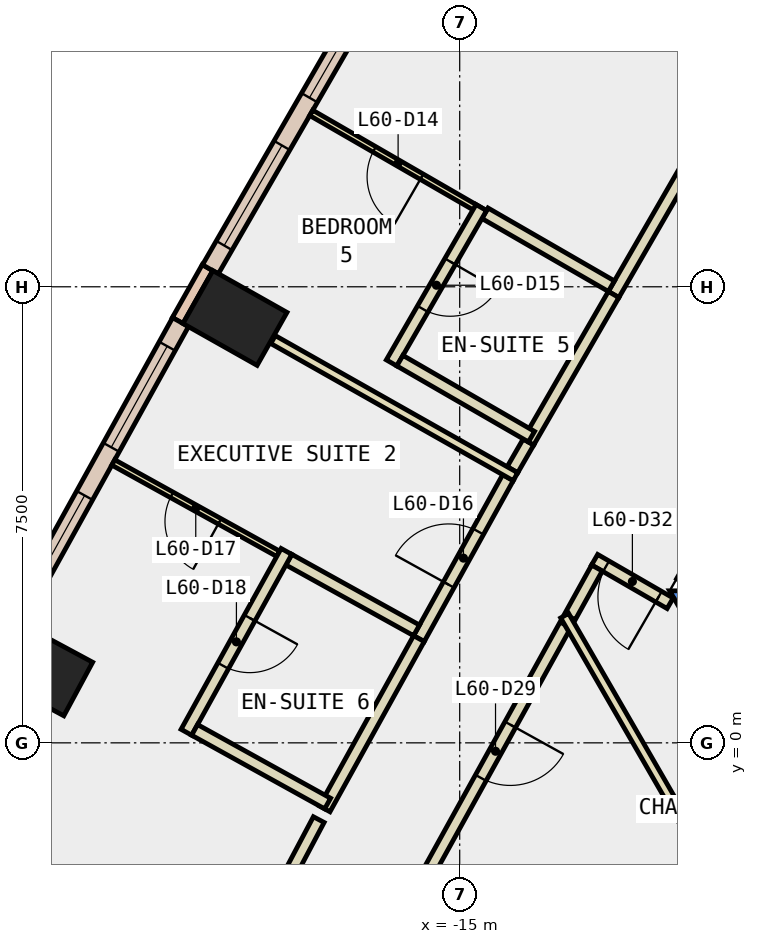
"""IFC4 building model, lengths in metres.
Left out: names, types, materials, properties, quantities, classifications, styles, units other than length and angle.
Written with IfcOpenShell. Run it as: python <this file> out.ifc"""

import sys

from ifc_helpers import new_model, si_unit, direction, frame, frame_2d, origin, origin_2d, place, context, subcontext, project, spatial, polyline, rectangle, outline, extrude, element, fill, save


model = new_model("IFC4")
c1 = context("Model", 3, precision=1e-05, world=origin(), true_north=direction((0.0, 1.0)))
c2 = subcontext(c1, "Body", "Model", "MODEL_VIEW")
j1 = project(units=[si_unit("LENGTHUNIT", "METRE"), si_unit("PLANEANGLEUNIT", "RADIAN")], contexts=[c1])
p1 = place(None, origin())
s1 = spatial("IfcSite", under=j1, at=p1, CompositionType="ELEMENT")
p2 = place(p1, origin())
s2 = spatial("IfcBuilding", under=s1, at=p2, CompositionType="ELEMENT")
p3 = place(p2, frame((0.0, 0.0, 263.0)))
s3 = spatial("IfcBuildingStorey", under=s2, at=p3, CompositionType="ELEMENT", Elevation=263.0)
for number, where, z_axis, x_axis in (
    (1, (-18.696, 6.987, -0.34), (0.0, 0.0, 1.0), (0.491, 0.871, 0.0)),
    (2, (-21.89, 1.217, -0.34), (0.0, 0.0, 1.0), (0.474, 0.881, 0.0)),
):
    element("IfcColumn", number, at=place(p3, frame(where, z_axis=z_axis, x_axis=x_axis)), inside=s3, PredefinedType="COLUMN", context=c2, shape_type="SweptSolid", body=[
        extrude(rectangle(XDim=1.0, YDim=1.4, at=origin_2d()), origin(), (0.0, 0.0, 1.0), 3.6),
    ])
p4 = place(p3, frame((0.0, 0.0, -0.34)))
e3 = element("IfcWall", 3, at=p4, inside=s3, PredefinedType="SHEAR", context=c2, shape_type="SweptSolid", body=[
    extrude(outline(polyline([(-11.547, 2.5), (-5.774, -7.5), (-5.427, -6.9), (-10.854, 2.5), (-11.547, 2.5)])), origin(), (0.0, 0.0, 1.0), 3.6),
])
p5 = place(p3, frame((-19.147, 7.815, 0.0), z_axis=(0.0, 0.0, 1.0), x_axis=(-0.491848119507, -0.870681013539, 0.0)))
e4 = element("IfcWall", 4, at=p5, inside=s3, PredefinedType="STANDARD", context=c2, shape_type="SweptSolid", body=[
    extrude(rectangle(XDim=1.0, YDim=0.2, at=frame_2d((0.5, 0.0))), origin(), (0.0, 0.0, 1.0), 3.26),
])
p6 = place(p3, frame((-16.294, 12.647, 0.0), z_axis=(0.0, 0.0, 1.0), x_axis=(-0.500041292042, -0.866001562501, 0.0)))
e5 = element("IfcWall", 5, at=p6, inside=s3, PredefinedType="STANDARD", context=c2, shape_type="SweptSolid", body=[
    extrude(rectangle(XDim=5.612, YDim=0.3, at=frame_2d((2.806, 0.0))), origin(), (0.0, 0.0, 1.0), 3.26),
])
p7 = place(p6, frame((0.453, 0.0, 0.9)))
e6 = element("IfcOpeningElement", 6, at=p7, cuts=e5, PredefinedType="OPENING", context=c2, shape_type="SweptSolid", body=[
    extrude(rectangle(XDim=1.9, YDim=2.0, at=frame_2d((0.95, 1.0))), frame((0.0, 0.16, 0.0), z_axis=(0.0, -1.0, 0.0), x_axis=(1.0, 0.0, 0.0)), (0.0, 0.0, 1.0), 0.32),
])
p8 = place(p6, frame((3.259, 0.0, 0.9)))
e7 = element("IfcOpeningElement", 7, at=p8, cuts=e5, PredefinedType="OPENING", context=c2, shape_type="SweptSolid", body=[
    extrude(rectangle(XDim=1.9, YDim=2.0, at=frame_2d((0.95, 1.0))), frame((0.0, 0.16, 0.0), z_axis=(0.0, -1.0, 0.0), x_axis=(1.0, 0.0, 0.0)), (0.0, 0.0, 1.0), 0.32),
])
p9 = place(p3, frame((-19.591, 6.919, 0.0), z_axis=(0.0, 0.0, 1.0), x_axis=(-0.484260568952, -0.874923826032, 0.0)))
e8 = element("IfcWall", 8, at=p9, inside=s3, PredefinedType="STANDARD", context=c2, shape_type="SweptSolid", body=[
    extrude(rectangle(XDim=5.611, YDim=0.3, at=frame_2d((2.805, 0.0))), origin(), (0.0, 0.0, 1.0), 3.26),
])
p10 = place(p9, frame((0.453, 0.0, 0.9)))
e9 = element("IfcOpeningElement", 9, at=p10, cuts=e8, PredefinedType="OPENING", context=c2, shape_type="SweptSolid", body=[
    extrude(rectangle(XDim=1.9, YDim=2.0, at=frame_2d((0.95, 1.0))), frame((0.0, 0.16, 0.0), z_axis=(0.0, -1.0, 0.0), x_axis=(1.0, 0.0, 0.0)), (0.0, 0.0, 1.0), 0.32),
])
p11 = place(p9, frame((3.258, 0.0, 0.9)))
e10 = element("IfcOpeningElement", 10, at=p11, cuts=e8, PredefinedType="OPENING", context=c2, shape_type="SweptSolid", body=[
    extrude(rectangle(XDim=1.9, YDim=2.0, at=frame_2d((0.95, 1.0))), frame((0.0, 0.16, 0.0), z_axis=(0.0, -1.0, 0.0), x_axis=(1.0, 0.0, 0.0)), (0.0, 0.0, 1.0), 0.32),
])
p12 = place(p3, frame((-11.539, 2.295, 0.0), z_axis=(0.0, 0.0, 1.0), x_axis=(-0.866023989838, 0.500002449018, 0.0)))
e11 = element("IfcWall", 11, at=p12, inside=s3, PredefinedType="PARTITIONING", context=c2, shape_type="SweptSolid", body=[
    extrude(rectangle(XDim=1.434, YDim=0.2, at=frame_2d((0.717, 0.0))), origin(), (0.0, 0.0, 1.0), 3.26),
])
p13 = place(p12, frame((0.217, 0.0, 0.0)))
e12 = element("IfcOpeningElement", 12, at=p13, cuts=e11, PredefinedType="OPENING", context=c2, shape_type="SweptSolid", body=[
    extrude(rectangle(XDim=1.0, YDim=2.1, at=frame_2d((0.5, 1.05))), frame((0.0, 0.11, 0.0), z_axis=(0.0, -1.0, 0.0), x_axis=(1.0, 0.0, 0.0)), (0.0, 0.0, 1.0), 0.22),
])
p14 = place(p3, frame((-12.743, 2.875, 0.0), z_axis=(0.0, 0.0, 1.0), x_axis=(-0.484334040176, -0.8748831565, 0.0)))
e13 = element("IfcWall", 13, at=p14, inside=s3, PredefinedType="PARTITIONING", context=c2, shape_type="SweptSolid", body=[
    extrude(rectangle(XDim=0.919, YDim=0.2, at=frame_2d((0.459, 0.0))), origin(), (0.0, 0.0, 1.0), 3.26),
])
p15 = place(p3, frame((-13.261, 1.939, 0.0), z_axis=(0.0, 0.0, 1.0), x_axis=(-0.484323615817, -0.874888927329, 0.0)))
e14 = element("IfcWall", 14, at=p15, inside=s3, PredefinedType="PARTITIONING", context=c2, shape_type="SweptSolid", body=[
    extrude(rectangle(XDim=4.747, YDim=0.2, at=frame_2d((2.374, 0.0))), origin(), (0.0, 0.0, 1.0), 3.26),
])
p16 = place(p15, frame((1.874, 0.0, 0.0)))
e15 = element("IfcOpeningElement", 15, at=p16, cuts=e14, PredefinedType="OPENING", context=c2, shape_type="SweptSolid", body=[
    extrude(rectangle(XDim=1.0, YDim=2.1, at=frame_2d((0.5, 1.05))), frame((0.0, 0.11, 0.0), z_axis=(0.0, -1.0, 0.0), x_axis=(1.0, 0.0, 0.0)), (0.0, 0.0, 1.0), 0.22),
])
p17 = place(p3, frame((-12.469, 7.373, 0.0), z_axis=(0.0, 0.0, 1.0), x_axis=(0.500129289791, 0.86595074542, 0.0)))
e16 = element("IfcWall", 16, at=p17, inside=s3, PredefinedType="PARTITIONING", context=c2, shape_type="SweptSolid", body=[
    extrude(rectangle(XDim=3.099, YDim=0.2, at=frame_2d((1.55, 0.0))), origin(), (0.0, 0.0, 1.0), 3.26),
])
p18 = place(p3, frame((-14.132, 4.492, 0.0), z_axis=(0.0, 0.0, 1.0), x_axis=(0.499829488579, 0.86612382622, 0.0)))
e17 = element("IfcWall", 17, at=p18, inside=s3, PredefinedType="PARTITIONING", context=c2, shape_type="SweptSolid", body=[
    extrude(rectangle(XDim=0.527, YDim=0.2, at=frame_2d((0.263, 0.0))), origin(), (0.0, 0.0, 1.0), 3.26),
])
p19 = place(p3, frame((-13.869, 4.948, 0.0), z_axis=(0.0, 0.0, 1.0), x_axis=(0.49994636267, 0.866056369097, 0.0)))
e18 = element("IfcWall", 18, at=p19, inside=s3, PredefinedType="PARTITIONING", context=c2, shape_type="SweptSolid", body=[
    extrude(rectangle(XDim=2.8, YDim=0.2, at=frame_2d((1.4, 0.0))), origin(), (0.0, 0.0, 1.0), 3.26),
])
p20 = place(p3, frame((-15.671, 1.714, 0.0), z_axis=(0.0, 0.0, 1.0), x_axis=(0.484203367026, 0.874955484216, 0.0)))
e19 = element("IfcWall", 19, at=p20, inside=s3, PredefinedType="PARTITIONING", context=c2, shape_type="SweptSolid", body=[
    extrude(rectangle(XDim=3.025, YDim=0.2, at=frame_2d((1.513, 0.0))), origin(), (0.0, 0.0, 1.0), 3.26),
])
p21 = place(p20, frame((1.013, 0.0, 0.0)))
e20 = element("IfcOpeningElement", 20, at=p21, cuts=e19, PredefinedType="OPENING", context=c2, shape_type="SweptSolid", body=[
    extrude(rectangle(XDim=1.0, YDim=2.1, at=frame_2d((0.5, 1.05))), frame((0.0, 0.11, 0.0), z_axis=(0.0, -1.0, 0.0), x_axis=(1.0, 0.0, 0.0)), (0.0, 0.0, 1.0), 0.22),
])
p22 = place(p3, frame((-20.229, -6.754, 0.0), z_axis=(0.0, 0.0, 1.0), x_axis=(0.468313568794, 0.883562335822, 0.0)))
e21 = element("IfcWall", 21, at=p22, inside=s3, PredefinedType="PARTITIONING", context=c2, shape_type="SweptSolid", body=[
    extrude(rectangle(XDim=6.216, YDim=0.2, at=frame_2d((3.108, 0.0))), origin(), (0.0, 0.0, 1.0), 3.26),
])
p23 = place(p3, frame((-17.221, -1.085, 0.0), z_axis=(0.0, 0.0, 1.0), x_axis=(0.48445041864, 0.874818719438, 0.0)))
e22 = element("IfcWall", 22, at=p23, inside=s3, PredefinedType="PARTITIONING", context=c2, shape_type="SweptSolid", body=[
    extrude(rectangle(XDim=3.2, YDim=0.2, at=frame_2d((1.6, 0.0))), origin(), (0.0, 0.0, 1.0), 3.26),
])
p24 = place(p3, frame((-13.274, 2.092, 0.0), z_axis=(0.0, 0.0, 1.0), x_axis=(0.500002592159, -0.866023907196, 0.0)))
e23 = element("IfcWall", 23, at=p24, inside=s3, PredefinedType="PARTITIONING", context=c2, shape_type="SweptSolid", body=[
    extrude(rectangle(XDim=6.538, YDim=0.15, at=frame_2d((3.269, 0.0))), origin(), (0.0, 0.0, 1.0), 3.26),
])
p25 = place(p3, frame((-14.584, 8.71, 0.0), z_axis=(0.0, 0.0, 1.0), x_axis=(-0.866008176907, 0.50002983664, 0.0)))
e24 = element("IfcWall", 24, at=p25, inside=s3, PredefinedType="PARTITIONING", context=c2, shape_type="SweptSolid", body=[
    extrude(rectangle(XDim=3.3, YDim=0.1, at=frame_2d((1.65, 0.0))), origin(), (0.0, 0.0, 1.0), 3.26),
])
p26 = place(p25, frame((1.2, 0.0, 0.0)))
e25 = element("IfcOpeningElement", 25, at=p26, cuts=e24, PredefinedType="OPENING", context=c2, shape_type="SweptSolid", body=[
    extrude(rectangle(XDim=0.9, YDim=2.1, at=frame_2d((0.45, 1.05))), frame((0.0, 0.06, 0.0), z_axis=(0.0, -1.0, 0.0), x_axis=(1.0, 0.0, 0.0)), (0.0, 0.0, 1.0), 0.12),
])
p27 = place(p3, frame((-12.505, 7.51, 0.0), z_axis=(0.0, 0.0, 1.0), x_axis=(-0.866277021052, 0.499563932643, 0.0)))
e26 = element("IfcWall", 26, at=p27, inside=s3, PredefinedType="PARTITIONING", context=c2, shape_type="SweptSolid", body=[
    extrude(rectangle(XDim=2.4, YDim=0.2, at=frame_2d((1.2, 0.0))), origin(), (0.0, 0.0, 1.0), 3.26),
])
p28 = place(p3, frame((-14.645, 8.803, 0.0), z_axis=(0.0, 0.0, 1.0), x_axis=(-0.500001826776, -0.866024349092, 0.0)))
e27 = element("IfcWall", 27, at=p28, inside=s3, PredefinedType="PARTITIONING", context=c2, shape_type="SweptSolid", body=[
    extrude(rectangle(XDim=2.95, YDim=0.2, at=frame_2d((1.475, 0.0))), origin(), (0.0, 0.0, 1.0), 3.26),
])
p29 = place(p28, frame((1.025, 0.0, 0.0)))
e28 = element("IfcOpeningElement", 28, at=p29, cuts=e27, PredefinedType="OPENING", context=c2, shape_type="SweptSolid", body=[
    extrude(rectangle(XDim=0.9, YDim=2.1, at=frame_2d((0.45, 1.05))), frame((0.0, 0.11, 0.0), z_axis=(0.0, -1.0, 0.0), x_axis=(1.0, 0.0, 0.0)), (0.0, 0.0, 1.0), 0.22),
])
p30 = place(p3, frame((-15.984, 6.285, 0.0), z_axis=(0.0, 0.0, 1.0), x_axis=(0.865998541277, -0.500046524342, 0.0)))
e29 = element("IfcWall", 29, at=p30, inside=s3, PredefinedType="PARTITIONING", context=c2, shape_type="SweptSolid", body=[
    extrude(rectangle(XDim=2.5, YDim=0.2, at=frame_2d((1.25, 0.0))), origin(), (0.0, 0.0, 1.0), 3.26),
])
p31 = place(p3, frame((-14.083, 4.377, 0.0), z_axis=(0.0, 0.0, 1.0), x_axis=(-0.870415885751, 0.492317159799, 0.0)))
e30 = element("IfcWall", 30, at=p31, inside=s3, PredefinedType="PARTITIONING", context=c2, shape_type="SweptSolid", body=[
    extrude(rectangle(XDim=4.581, YDim=0.15, at=frame_2d((2.29, 0.0))), origin(), (0.0, 0.0, 1.0), 3.26),
])
p32 = place(p3, frame((-17.985, 3.109, 0.0), z_axis=(0.0, 0.0, 1.0), x_axis=(-0.874762085098, 0.484552674614, 0.0)))
e31 = element("IfcWall", 31, at=p32, inside=s3, PredefinedType="PARTITIONING", context=c2, shape_type="SweptSolid", body=[
    extrude(rectangle(XDim=3.1, YDim=0.1, at=frame_2d((1.55, 0.0))), origin(), (0.0, 0.0, 1.0), 3.26),
])
p33 = place(p32, frame((1.1, 0.0, 0.0)))
e32 = element("IfcOpeningElement", 32, at=p33, cuts=e31, PredefinedType="OPENING", context=c2, shape_type="SweptSolid", body=[
    extrude(rectangle(XDim=0.9, YDim=2.1, at=frame_2d((0.45, 1.05))), frame((0.0, 0.06, 0.0), z_axis=(0.0, -1.0, 0.0), x_axis=(1.0, 0.0, 0.0)), (0.0, 0.0, 1.0), 0.12),
])
p34 = place(p3, frame((-15.71, 1.85, 0.0), z_axis=(0.0, 0.0, 1.0), x_axis=(-0.874842414173, 0.484407628308, 0.0)))
e33 = element("IfcWall", 33, at=p34, inside=s3, PredefinedType="PARTITIONING", context=c2, shape_type="SweptSolid", body=[
    extrude(rectangle(XDim=2.401, YDim=0.2, at=frame_2d((1.2, 0.0))), origin(), (0.0, 0.0, 1.0), 3.26),
])
p35 = place(p3, frame((-17.849, 3.148, 0.0), z_axis=(0.0, 0.0, 1.0), x_axis=(-0.484257957482, -0.874925271446, 0.0)))
e34 = element("IfcWall", 34, at=p35, inside=s3, PredefinedType="PARTITIONING", context=c2, shape_type="SweptSolid", body=[
    extrude(rectangle(XDim=3.399, YDim=0.2, at=frame_2d((1.699, 0.0))), origin(), (0.0, 0.0, 1.0), 3.26),
])
p36 = place(p35, frame((1.25, 0.0, 0.0)))
e35 = element("IfcOpeningElement", 35, at=p36, cuts=e34, PredefinedType="OPENING", context=c2, shape_type="SweptSolid", body=[
    extrude(rectangle(XDim=0.9, YDim=2.1, at=frame_2d((0.45, 1.05))), frame((0.0, 0.11, 0.0), z_axis=(0.0, -1.0, 0.0), x_axis=(1.0, 0.0, 0.0)), (0.0, 0.0, 1.0), 0.22),
])
p37 = place(p3, frame((-19.36, 0.213, 0.0), z_axis=(0.0, 0.0, 1.0), x_axis=(0.874939003568, -0.484233146362, 0.0)))
e36 = element("IfcWall", 36, at=p37, inside=s3, PredefinedType="PARTITIONING", context=c2, shape_type="SweptSolid", body=[
    extrude(rectangle(XDim=2.501, YDim=0.2, at=frame_2d((1.25, 0.0))), origin(), (0.0, 0.0, 1.0), 3.26),
])
p38 = place(p3, frame((-10.449, 4.203, 0.0), z_axis=(0.0, 0.0, 1.0), x_axis=(-0.499914839587, -0.866074565589, 0.0)))
e37 = element("IfcWall", 37, at=p38, inside=s3, PredefinedType="PARTITIONING", context=c2, shape_type="SweptSolid", body=[
    extrude(rectangle(XDim=1.794, YDim=0.2, at=frame_2d((0.897, 0.0))), origin(), (0.0, 0.0, 1.0), 2.4),
])
p39 = place(p38, frame((0.397, 0.0, 0.0)))
e38 = element("IfcOpeningElement", 38, at=p39, cuts=e37, PredefinedType="OPENING", context=c2, shape_type="SweptSolid", body=[
    extrude(rectangle(XDim=1.0, YDim=2.1, at=frame_2d((0.5, 1.05))), frame((0.0, 0.11, 0.0), z_axis=(0.0, -1.0, 0.0), x_axis=(1.0, 0.0, 0.0)), (0.0, 0.0, 1.0), 0.22),
])
p40 = place(p7, origin())
e39 = element("IfcWindow", 39, at=p40, inside=s3, PartitioningType="SINGLE_PANEL", PredefinedType="WINDOW", context=c2, shape_type="SweptSolid", body=[
    extrude(rectangle(XDim=1.9, YDim=2.0, at=frame_2d((0.95, 1.0))), frame((0.0, 0.03, 0.0), z_axis=(0.0, -1.0, 0.0), x_axis=(1.0, 0.0, 0.0)), (0.0, 0.0, 1.0), 0.06),
])
fill(e6, e39)
p41 = place(p8, origin())
e40 = element("IfcWindow", 40, at=p41, inside=s3, PartitioningType="SINGLE_PANEL", PredefinedType="WINDOW", context=c2, shape_type="SweptSolid", body=[
    extrude(rectangle(XDim=1.9, YDim=2.0, at=frame_2d((0.95, 1.0))), frame((0.0, 0.03, 0.0), z_axis=(0.0, -1.0, 0.0), x_axis=(1.0, 0.0, 0.0)), (0.0, 0.0, 1.0), 0.06),
])
fill(e7, e40)
p42 = place(p10, origin())
e41 = element("IfcWindow", 41, at=p42, inside=s3, PartitioningType="SINGLE_PANEL", PredefinedType="WINDOW", context=c2, shape_type="SweptSolid", body=[
    extrude(rectangle(XDim=1.9, YDim=2.0, at=frame_2d((0.95, 1.0))), frame((0.0, 0.03, 0.0), z_axis=(0.0, -1.0, 0.0), x_axis=(1.0, 0.0, 0.0)), (0.0, 0.0, 1.0), 0.06),
])
fill(e9, e41)
p43 = place(p11, origin())
e42 = element("IfcWindow", 42, at=p43, inside=s3, PartitioningType="SINGLE_PANEL", PredefinedType="WINDOW", context=c2, shape_type="SweptSolid", body=[
    extrude(rectangle(XDim=1.9, YDim=2.0, at=frame_2d((0.95, 1.0))), frame((0.0, 0.03, 0.0), z_axis=(0.0, -1.0, 0.0), x_axis=(1.0, 0.0, 0.0)), (0.0, 0.0, 1.0), 0.06),
])
fill(e10, e42)
p44 = place(p26, origin())
e43 = element("IfcDoor", 43, at=p44, inside=s3, OperationType="SINGLE_SWING_LEFT", PredefinedType="DOOR", context=c2, shape_type="SweptSolid", body=[
    extrude(rectangle(XDim=0.9, YDim=2.1, at=frame_2d((0.45, 1.05))), frame((0.0, 0.025, 0.0), z_axis=(0.0, -1.0, 0.0), x_axis=(1.0, 0.0, 0.0)), (0.0, 0.0, 1.0), 0.05),
])
fill(e25, e43)
p45 = place(p29, origin())
e44 = element("IfcDoor", 44, at=p45, inside=s3, OperationType="SINGLE_SWING_LEFT", PredefinedType="DOOR", context=c2, shape_type="SweptSolid", body=[
    extrude(rectangle(XDim=0.9, YDim=2.1, at=frame_2d((0.45, 1.05))), frame((0.0, 0.025, 0.0), z_axis=(0.0, -1.0, 0.0), x_axis=(1.0, 0.0, 0.0)), (0.0, 0.0, 1.0), 0.05),
])
fill(e28, e44)
p46 = place(p21, origin())
e45 = element("IfcDoor", 45, at=p46, inside=s3, OperationType="SINGLE_SWING_RIGHT", PredefinedType="DOOR", context=c2, shape_type="SweptSolid", body=[
    extrude(rectangle(XDim=1.0, YDim=2.1, at=frame_2d((0.5, 1.05))), frame((0.0, 0.025, 0.0), z_axis=(0.0, -1.0, 0.0), x_axis=(1.0, 0.0, 0.0)), (0.0, 0.0, 1.0), 0.05),
])
fill(e20, e45)
p47 = place(p33, origin())
e46 = element("IfcDoor", 46, at=p47, inside=s3, OperationType="SINGLE_SWING_LEFT", PredefinedType="DOOR", context=c2, shape_type="SweptSolid", body=[
    extrude(rectangle(XDim=0.9, YDim=2.1, at=frame_2d((0.45, 1.05))), frame((0.0, 0.025, 0.0), z_axis=(0.0, -1.0, 0.0), x_axis=(1.0, 0.0, 0.0)), (0.0, 0.0, 1.0), 0.05),
])
fill(e32, e46)
p48 = place(p36, origin())
e47 = element("IfcDoor", 47, at=p48, inside=s3, OperationType="SINGLE_SWING_LEFT", PredefinedType="DOOR", context=c2, shape_type="SweptSolid", body=[
    extrude(rectangle(XDim=0.9, YDim=2.1, at=frame_2d((0.45, 1.05))), frame((0.0, 0.025, 0.0), z_axis=(0.0, -1.0, 0.0), x_axis=(1.0, 0.0, 0.0)), (0.0, 0.0, 1.0), 0.05),
])
fill(e35, e47)
p49 = place(p16, origin())
e48 = element("IfcDoor", 48, at=p49, inside=s3, OperationType="SINGLE_SWING_LEFT", PredefinedType="DOOR", context=c2, shape_type="SweptSolid", body=[
    extrude(rectangle(XDim=1.0, YDim=2.1, at=frame_2d((0.5, 1.05))), frame((0.0, 0.025, 0.0), z_axis=(0.0, -1.0, 0.0), x_axis=(1.0, 0.0, 0.0)), (0.0, 0.0, 1.0), 0.05),
])
fill(e15, e48)
p50 = place(p13, origin())
e49 = element("IfcDoor", 49, at=p50, inside=s3, OperationType="SINGLE_SWING_RIGHT", PredefinedType="DOOR", context=c2, shape_type="SweptSolid", body=[
    extrude(rectangle(XDim=1.0, YDim=2.1, at=frame_2d((0.5, 1.05))), frame((0.0, 0.025, 0.0), z_axis=(0.0, -1.0, 0.0), x_axis=(1.0, 0.0, 0.0)), (0.0, 0.0, 1.0), 0.05),
])
fill(e12, e49)
save(model, sys.argv[1])
